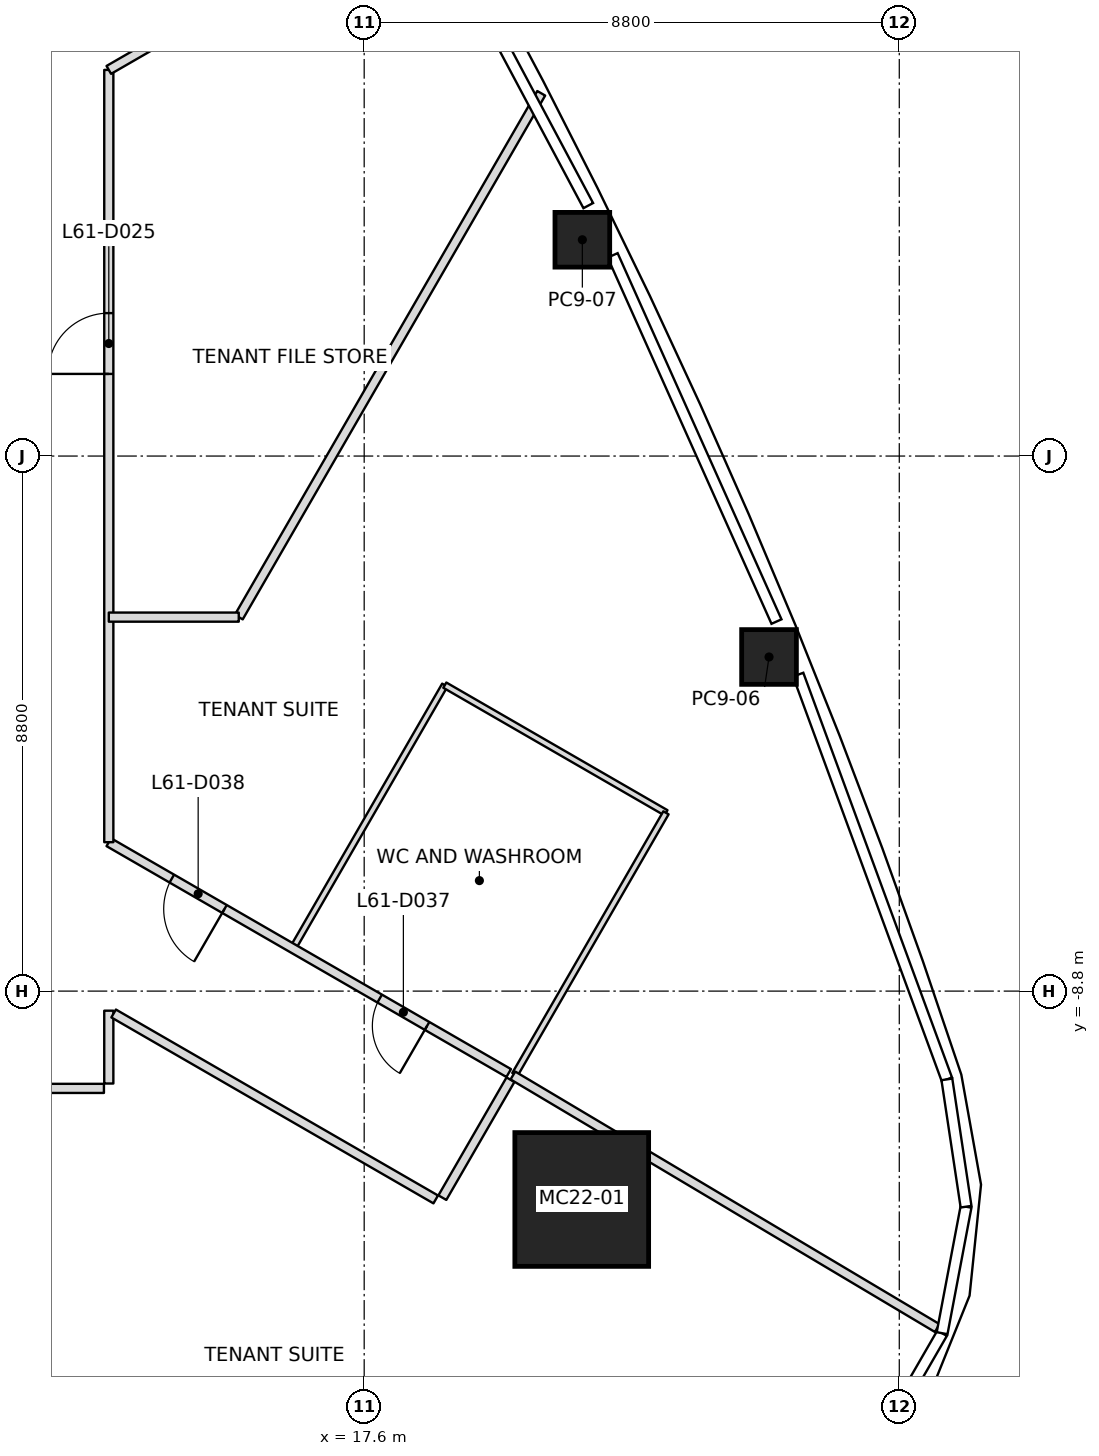
"""IFC4 building model, lengths in metres.
Left out: names, types, materials, properties, quantities, classifications, styles, units other than length and angle.
Written with IfcOpenShell. Run it as: python <this file> out.ifc"""

import sys

from ifc_helpers import new_model, si_unit, direction, frame, frame_2d, origin, origin_2d, place, context, subcontext, project, spatial, rectangle, extrude, element, fill, save


model = new_model("IFC4")
c1 = context("Model", 3, precision=1e-05, world=origin(), true_north=direction((0.0, 1.0)))
c2 = subcontext(c1, "Body", "Model", "MODEL_VIEW")
j1 = project(units=[si_unit("LENGTHUNIT", "METRE"), si_unit("PLANEANGLEUNIT", "RADIAN")], contexts=[c1])
p1 = place(None, origin())
s1 = spatial("IfcSite", under=j1, at=p1, CompositionType="ELEMENT")
p2 = place(p1, origin())
s2 = spatial("IfcBuilding", under=s1, at=p2, CompositionType="ELEMENT")
p3 = place(p2, frame((0.0, 0.0, 271.0)))
s3 = spatial("IfcBuildingStorey", under=s2, at=p3, CompositionType="ELEMENT", Elevation=271.0)
p4 = place(p3, frame((21.178, -12.227, 0.0), z_axis=(-0.027817676907, 0.016043967164, 0.999484250986), x_axis=(0.999613013546, 0.000446478676, 0.027814093645)))
e1 = element("IfcColumn", 1, at=p4, inside=s3, PredefinedType="COLUMN", context=c2, shape_type="SweptSolid", body=[
    extrude(rectangle(XDim=2.2, YDim=2.2, at=origin_2d()), origin(), (0.0, 0.0, 1.0), 4.002),
])
p5 = place(p3, frame((24.258, -3.305, 0.0), z_axis=(-0.017696547774, 0.0099466803, 0.999793926641), x_axis=(-0.376779665918, 0.926166726623, -0.015883256809)))
e2 = element("IfcColumn", 2, at=p5, inside=s3, PredefinedType="COLUMN", context=c2, shape_type="SweptSolid", body=[
    extrude(rectangle(XDim=0.9, YDim=0.9, at=origin_2d()), origin(), (0.0, 0.0, 1.0), 4.001),
])
p6 = place(p3, frame((21.188, 3.557, 0.0), z_axis=(-0.014036676147, 0.001952928855, 0.999899573853), x_axis=(-0.439409931321, 0.898251713248, -0.007922872255)))
e3 = element("IfcColumn", 3, at=p6, inside=s3, PredefinedType="COLUMN", context=c2, shape_type="SweptSolid", body=[
    extrude(rectangle(XDim=0.9, YDim=0.9, at=origin_2d()), origin(), (0.0, 0.0, 1.0), 4.0),
])
p7 = place(p3, frame((20.511, 5.966, 0.0), z_axis=(0.0, 0.0, 1.0), x_axis=(-0.500016313644, -0.866015984893, 0.0)))
e4 = element("IfcWall", 4, at=p7, inside=s3, PredefinedType="PARTITIONING", context=c2, shape_type="SweptSolid", body=[
    extrude(rectangle(XDim=9.948, YDim=0.15, at=frame_2d((4.974, 0.0))), origin(), (0.0, 0.0, 1.0), 3.084),
])
p8 = place(p3, frame((15.537, -2.649, 0.0), z_axis=(0.0, 0.0, 1.0), x_axis=(-1.0, 0.0, 0.0)))
e5 = element("IfcWall", 5, at=p8, inside=s3, PredefinedType="PARTITIONING", context=c2, shape_type="SweptSolid", body=[
    extrude(rectangle(XDim=2.137, YDim=0.15, at=frame_2d((1.069, 0.0))), origin(), (0.0, 0.0, 1.0), 3.167),
])
p9 = place(p3, frame((20.046, -10.188, 0.0), z_axis=(0.0, 0.0, 1.0), x_axis=(0.859283446729, -0.511499714739, 0.0)))
e6 = element("IfcWall", 6, at=p9, inside=s3, PredefinedType="PARTITIONING", context=c2, shape_type="SweptSolid", body=[
    extrude(rectangle(XDim=8.121, YDim=0.15, at=frame_2d((4.061, 0.0))), origin(), (0.0, 0.0, 1.0), 3.084),
])
p10 = place(p3, frame((1.2, -10.4, 0.0), z_axis=(0.0, 0.0, 1.0), x_axis=(1.0, 0.0, 0.0)))
e7 = element("IfcWall", 7, at=p10, inside=s3, PredefinedType="PARTITIONING", context=c2, shape_type="SweptSolid", body=[
    extrude(rectangle(XDim=12.12, YDim=0.15, at=frame_2d((6.06, 0.0))), origin(), (0.0, 0.0, 1.0), 3.243),
])
p11 = place(p10, frame((1.65, 0.0, 0.0)))
e8 = element("IfcOpeningElement", 8, at=p11, cuts=e7, PredefinedType="OPENING", context=c2, shape_type="SweptSolid", body=[
    extrude(rectangle(XDim=0.9, YDim=2.1, at=frame_2d((0.45, 1.05))), frame((0.0, 0.075, 0.0), z_axis=(0.0, -1.0, 0.0), x_axis=(1.0, 0.0, 0.0)), (0.0, 0.0, 1.0), 0.15),
])
p12 = place(p10, frame((7.75, 0.0, 0.0)))
e9 = element("IfcOpeningElement", 9, at=p12, cuts=e7, PredefinedType="OPENING", context=c2, shape_type="SweptSolid", body=[
    extrude(rectangle(XDim=1.0, YDim=2.1, at=frame_2d((0.5, 1.05))), frame((0.0, 0.075, 0.0), z_axis=(0.0, -1.0, 0.0), x_axis=(1.0, 0.0, 0.0)), (0.0, 0.0, 1.0), 0.15),
])
p13 = place(p3, frame((13.4, -10.32, 0.0), z_axis=(0.0, 0.0, 1.0), x_axis=(0.0, 1.0, 0.0)))
e10 = element("IfcWall", 10, at=p13, inside=s3, PredefinedType="PARTITIONING", context=c2, shape_type="SweptSolid", body=[
    extrude(rectangle(XDim=1.198, YDim=0.15, at=frame_2d((0.599, 0.0))), origin(), (0.0, 0.0, 1.0), 3.233),
])
p14 = place(p3, frame((13.479, -9.168, 0.0), z_axis=(0.0, 0.0, 1.0), x_axis=(0.866031386012, -0.499989638334, 0.0)))
e11 = element("IfcWall", 11, at=p14, inside=s3, PredefinedType="PARTITIONING", context=c2, shape_type="SweptSolid", body=[
    extrude(rectangle(XDim=6.117, YDim=0.15, at=frame_2d((3.059, 0.0))), origin(), (0.0, 0.0, 1.0), 3.233),
])
p15 = place(p3, frame((19.977, -10.148, 0.0), z_axis=(0.0, 0.0, 1.0), x_axis=(-0.866034613097, 0.499984048663, 0.0)))
e12 = element("IfcWall", 12, at=p15, inside=s3, PredefinedType="PARTITIONING", context=c2, shape_type="SweptSolid", body=[
    extrude(rectangle(XDim=7.594, YDim=0.15, at=frame_2d((3.797, 0.0))), origin(), (0.0, 0.0, 1.0), 3.167),
])
p16 = place(p15, frame((1.55, 0.0, 0.0)))
e13 = element("IfcOpeningElement", 13, at=p16, cuts=e12, PredefinedType="OPENING", context=c2, shape_type="SweptSolid", body=[
    extrude(rectangle(XDim=0.9, YDim=2.1, at=frame_2d((0.45, 1.05))), frame((0.0, 0.075, 0.0), z_axis=(0.0, -1.0, 0.0), x_axis=(1.0, 0.0, 0.0)), (0.0, 0.0, 1.0), 0.15),
])
p17 = place(p15, frame((5.397, 0.0, 0.0)))
e14 = element("IfcOpeningElement", 14, at=p17, cuts=e12, PredefinedType="OPENING", context=c2, shape_type="SweptSolid", body=[
    extrude(rectangle(XDim=1.0, YDim=2.1, at=frame_2d((0.5, 1.05))), frame((0.0, 0.075, 0.0), z_axis=(0.0, -1.0, 0.0), x_axis=(1.0, 0.0, 0.0)), (0.0, 0.0, 1.0), 0.15),
])
p18 = place(p3, frame((13.4, -6.351, 0.0), z_axis=(0.0, 0.0, 1.0), x_axis=(0.0, 1.0, 0.0)))
e15 = element("IfcWall", 15, at=p18, inside=s3, PredefinedType="PARTITIONING", context=c2, shape_type="SweptSolid", body=[
    extrude(rectangle(XDim=12.702, YDim=0.15, at=frame_2d((6.351, 0.0))), origin(), (0.0, 0.0, 1.0), 3.167),
])
p19 = place(p18, frame((7.702, 0.0, 0.0)))
e16 = element("IfcOpeningElement", 16, at=p19, cuts=e15, PredefinedType="OPENING", context=c2, shape_type="SweptSolid", body=[
    extrude(rectangle(XDim=1.0, YDim=2.1, at=frame_2d((0.5, 1.05))), frame((0.0, 0.075, 0.0), z_axis=(0.0, -1.0, 0.0), x_axis=(1.0, 0.0, 0.0)), (0.0, 0.0, 1.0), 0.15),
])
p20 = place(p3, frame((13.4, 6.351, 0.0), z_axis=(0.0, 0.0, 1.0), x_axis=(0.866016071844, 0.500016163047, 0.0)))
e17 = element("IfcWall", 17, at=p20, inside=s3, PredefinedType="PARTITIONING", context=c2, shape_type="SweptSolid", body=[
    extrude(rectangle(XDim=4.341, YDim=0.15, at=frame_2d((2.17, 0.0))), origin(), (0.0, 0.0, 1.0), 3.3),
])
p21 = place(p3, frame((18.886, -12.197, 0.0), z_axis=(0.0, 0.0, 1.0), x_axis=(0.500030632641, 0.866007717299, 0.0)))
e18 = element("IfcWall", 18, at=p21, inside=s3, PredefinedType="PARTITIONING", context=c2, shape_type="SweptSolid", body=[
    extrude(rectangle(XDim=2.24, YDim=0.15, at=frame_2d((1.12, 0.0))), origin(), (0.0, 0.0, 1.0), 3.233),
])
p22 = place(p3, frame((16.441, -8.072, 0.0), z_axis=(0.0, 0.0, 1.0), x_axis=(0.499974753747, 0.866039979225, 0.0)))
e19 = element("IfcWall", 19, at=p22, inside=s3, PredefinedType="PARTITIONING", context=c2, shape_type="SweptSolid", body=[
    extrude(rectangle(XDim=4.97, YDim=0.1, at=frame_2d((2.485, 0.0))), origin(), (0.0, 0.0, 1.0), 3.167),
])
p23 = place(p3, frame((18.926, -3.768, 0.0), z_axis=(0.0, 0.0, 1.0), x_axis=(0.866023935413, -0.500002543286, 0.0)))
e20 = element("IfcWall", 20, at=p23, inside=s3, PredefinedType="PARTITIONING", context=c2, shape_type="SweptSolid", body=[
    extrude(rectangle(XDim=4.2, YDim=0.1, at=frame_2d((2.1, 0.0))), origin(), (0.0, 0.0, 1.0), 3.167),
])
p24 = place(p3, frame((22.563, -5.868, 0.0), z_axis=(0.0, 0.0, 1.0), x_axis=(-0.500011595943, -0.86601870876, 0.0)))
e21 = element("IfcWall", 21, at=p24, inside=s3, PredefinedType="PARTITIONING", context=c2, shape_type="SweptSolid", body=[
    extrude(rectangle(XDim=4.97, YDim=0.1, at=frame_2d((2.485, 0.0))), origin(), (0.0, 0.0, 1.0), 3.3),
])
p25 = place(p19, origin())
e22 = element("IfcDoor", 22, at=p25, inside=s3, OperationType="SINGLE_SWING_RIGHT", PredefinedType="DOOR", context=c2, shape_type="SweptSolid", body=[
    extrude(rectangle(XDim=1.0, YDim=2.1, at=frame_2d((0.5, 1.05))), frame((0.0, 0.025, 0.0), z_axis=(0.0, -1.0, 0.0), x_axis=(1.0, 0.0, 0.0)), (0.0, 0.0, 1.0), 0.05),
])
fill(e16, e22)
p26 = place(p16, origin())
e23 = element("IfcDoor", 23, at=p26, inside=s3, OperationType="SINGLE_SWING_RIGHT", PredefinedType="DOOR", context=c2, shape_type="SweptSolid", body=[
    extrude(rectangle(XDim=0.9, YDim=2.1, at=frame_2d((0.45, 1.05))), frame((0.0, 0.025, 0.0), z_axis=(0.0, -1.0, 0.0), x_axis=(1.0, 0.0, 0.0)), (0.0, 0.0, 1.0), 0.05),
])
fill(e13, e23)
p27 = place(p17, origin())
e24 = element("IfcDoor", 24, at=p27, inside=s3, OperationType="SINGLE_SWING_LEFT", PredefinedType="DOOR", context=c2, shape_type="SweptSolid", body=[
    extrude(rectangle(XDim=1.0, YDim=2.1, at=frame_2d((0.5, 1.05))), frame((0.0, 0.025, 0.0), z_axis=(0.0, -1.0, 0.0), x_axis=(1.0, 0.0, 0.0)), (0.0, 0.0, 1.0), 0.05),
])
fill(e14, e24)
save(model, sys.argv[1])
